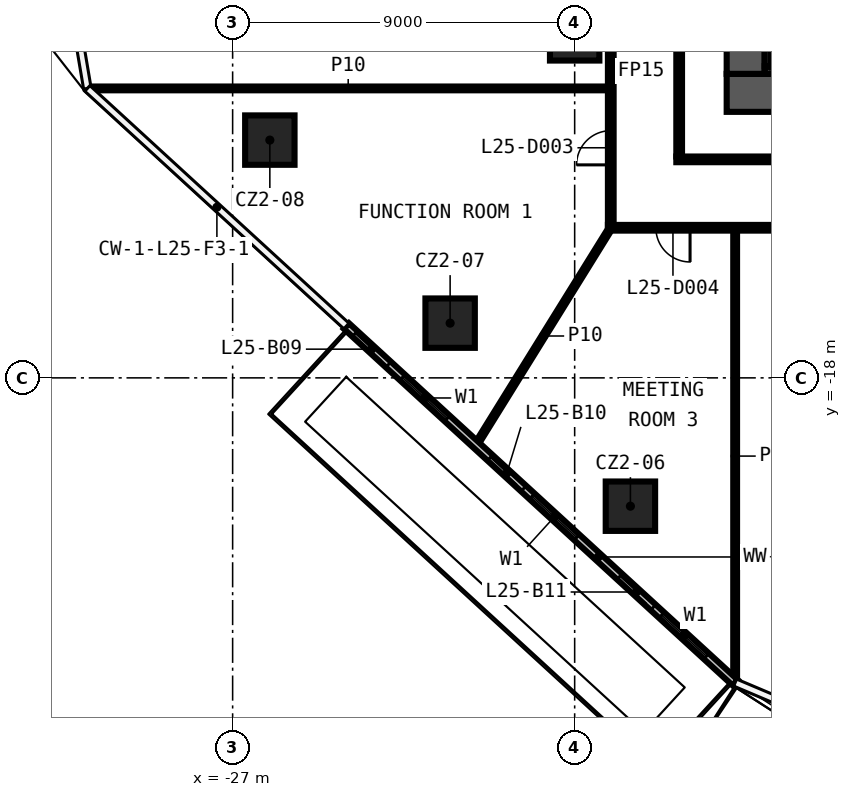
"""IFC4 building model, lengths in metres.
Left out: names, types, materials, properties, quantities, classifications, styles, units other than length and angle.
Written with IfcOpenShell. Run it as: python <this file> out.ifc"""

import sys

from ifc_helpers import new_model, si_unit, direction, frame, frame_2d, origin, origin_2d, place, context, subcontext, project, spatial, rectangle, extrude, element, fill, save


model = new_model("IFC4")
c1 = context("Model", 3, precision=1e-05, world=origin(), true_north=direction((0.0, 1.0)))
c2 = subcontext(c1, "Body", "Model", "MODEL_VIEW")
j1 = project(units=[si_unit("LENGTHUNIT", "METRE"), si_unit("PLANEANGLEUNIT", "RADIAN")], contexts=[c1])
p1 = place(None, origin())
s1 = spatial("IfcSite", under=j1, at=p1, CompositionType="ELEMENT")
p2 = place(p1, origin())
s2 = spatial("IfcBuilding", under=s1, at=p2, CompositionType="ELEMENT")
p3 = place(p2, frame((0.0, 0.0, 117.4)))
s3 = spatial("IfcBuildingStorey", under=s2, at=p3, CompositionType="ELEMENT", Elevation=117.4)
for number, where, z_axis, x_axis in (
    (1, (-16.533, -21.377, 0.0), (0.0, 0.0, 1.0), (1.0, 0.0, 0.0)),
    (2, (-21.277, -16.56, 0.0), (0.0, 0.0, 1.0), (1.0, 0.0, 0.0)),
    (3, (-26.021, -11.743, 0.0), (0.0, 0.0, 1.0), (1.0, 0.0, 0.0)),
    (4, (-18.0, -9.0, 0.0), (0.0, 0.0, 1.0), (1.0, 0.0, 0.0)),
):
    element("IfcColumn", number, at=place(p3, frame(where, z_axis=z_axis, x_axis=x_axis)), inside=s3, PredefinedType="COLUMN", context=c2, shape_type="SweptSolid", body=[
        extrude(rectangle(XDim=1.3, YDim=1.3, at=origin_2d()), origin(), (0.0, 0.0, 1.0), 3.3),
    ])
p4 = place(p3, frame((17.125, -14.05, 0.0), z_axis=(0.0, 0.0, 1.0), x_axis=(-1.0, 0.0, 0.0)))
e5 = element("IfcWall", 5, at=p4, inside=s3, PredefinedType="PARTITIONING", context=c2, shape_type="SweptSolid", body=[
    extrude(rectangle(XDim=34.25, YDim=0.15, at=frame_2d((17.125, 0.0))), origin(), (0.0, 0.0, 1.0), 3.3),
])
p5 = place(p4, frame((32.089, 0.0, 0.0)))
e6 = element("IfcOpeningElement", 6, at=p5, cuts=e5, PredefinedType="OPENING", context=c2, shape_type="SweptSolid", body=[
    extrude(rectangle(XDim=0.9, YDim=2.1, at=frame_2d((0.45, 1.05))), frame((0.0, 0.085, 0.0), z_axis=(0.0, -1.0, 0.0), x_axis=(1.0, 0.0, 0.0)), (0.0, 0.0, 1.0), 0.17),
])
p6 = place(p4, frame((25.666, 0.0, 0.0)))
e7 = element("IfcOpeningElement", 7, at=p6, cuts=e5, PredefinedType="OPENING", context=c2, shape_type="SweptSolid", body=[
    extrude(rectangle(XDim=1.0, YDim=2.1, at=frame_2d((0.5, 1.05))), frame((0.0, 0.085, 0.0), z_axis=(0.0, -1.0, 0.0), x_axis=(1.0, 0.0, 0.0)), (0.0, 0.0, 1.0), 0.17),
])
p7 = place(p4, frame((18.714, 0.0, 0.0)))
e8 = element("IfcOpeningElement", 8, at=p7, cuts=e5, PredefinedType="OPENING", context=c2, shape_type="SweptSolid", body=[
    extrude(rectangle(XDim=1.0, YDim=2.1, at=frame_2d((0.5, 1.05))), frame((0.0, 0.085, 0.0), z_axis=(0.0, -1.0, 0.0), x_axis=(1.0, 0.0, 0.0)), (0.0, 0.0, 1.0), 0.17),
])
p8 = place(p4, frame((16.558, 0.0, 0.0)))
e9 = element("IfcOpeningElement", 9, at=p8, cuts=e5, PredefinedType="OPENING", context=c2, shape_type="SweptSolid", body=[
    extrude(rectangle(XDim=1.0, YDim=2.1, at=frame_2d((0.5, 1.05))), frame((0.0, 0.085, 0.0), z_axis=(0.0, -1.0, 0.0), x_axis=(1.0, 0.0, 0.0)), (0.0, 0.0, 1.0), 0.17),
])
p9 = place(p4, frame((9.602, 0.0, 0.0)))
e10 = element("IfcOpeningElement", 10, at=p9, cuts=e5, PredefinedType="OPENING", context=c2, shape_type="SweptSolid", body=[
    extrude(rectangle(XDim=1.0, YDim=2.1, at=frame_2d((0.5, 1.05))), frame((0.0, 0.085, 0.0), z_axis=(0.0, -1.0, 0.0), x_axis=(1.0, 0.0, 0.0)), (0.0, 0.0, 1.0), 0.17),
])
p10 = place(p4, frame((7.451, 0.0, 0.0)))
e11 = element("IfcOpeningElement", 11, at=p10, cuts=e5, PredefinedType="OPENING", context=c2, shape_type="SweptSolid", body=[
    extrude(rectangle(XDim=1.0, YDim=2.1, at=frame_2d((0.5, 1.05))), frame((0.0, 0.085, 0.0), z_axis=(0.0, -1.0, 0.0), x_axis=(1.0, 0.0, 0.0)), (0.0, 0.0, 1.0), 0.17),
])
p11 = place(p4, frame((0.576, 0.0, 0.0)))
e12 = element("IfcOpeningElement", 12, at=p11, cuts=e5, PredefinedType="OPENING", context=c2, shape_type="SweptSolid", body=[
    extrude(rectangle(XDim=1.0, YDim=2.1, at=frame_2d((0.5, 1.05))), frame((0.0, 0.085, 0.0), z_axis=(0.0, -1.0, 0.0), x_axis=(1.0, 0.0, 0.0)), (0.0, 0.0, 1.0), 0.17),
])
p12 = place(p3, frame((-15.325, -12.25, 0.0), z_axis=(0.0, 0.0, 1.0), x_axis=(1.0, 0.0, 0.0)))
e13 = element("IfcWall", 13, at=p12, inside=s3, PredefinedType="PARTITIONING", context=c2, shape_type="SweptSolid", body=[
    extrude(rectangle(XDim=22.6, YDim=0.15, at=frame_2d((11.3, 0.0))), origin(), (0.0, 0.0, 1.0), 3.3),
])
p13 = place(p3, frame((-30.793, -10.383, 0.0), z_axis=(0.0, 0.0, 1.0), x_axis=(1.0, 0.0, 0.0)))
e14 = element("IfcWall", 14, at=p13, inside=s3, PredefinedType="PARTITIONING", context=c2, shape_type="SweptSolid", body=[
    extrude(rectangle(XDim=13.668, YDim=0.1, at=frame_2d((6.834, 0.0))), origin(), (0.0, 0.0, 1.0), 3.3),
])
p14 = place(p3, frame((-20.585, -19.747, 0.0), z_axis=(0.0, 0.0, 1.0), x_axis=(0.527253174698, 0.849708238027, 0.0)))
e15 = element("IfcWall", 15, at=p14, inside=s3, PredefinedType="PARTITIONING", context=c2, shape_type="SweptSolid", body=[
    extrude(rectangle(XDim=6.704, YDim=0.1, at=frame_2d((3.352, 0.0))), origin(), (0.0, 0.0, 1.0), 3.3),
])
p15 = place(p3, frame((-13.777, -25.992, 0.0), z_axis=(0.0, 0.0, 1.0), x_axis=(0.0, 1.0, 0.0)))
e16 = element("IfcWall", 16, at=p15, inside=s3, PredefinedType="PARTITIONING", context=c2, shape_type="SweptSolid", body=[
    extrude(rectangle(XDim=11.867, YDim=0.1, at=frame_2d((5.933, 0.0))), origin(), (0.0, 0.0, 1.0), 3.3),
])
p16 = place(p3, frame((-15.25, 12.175, 0.0), z_axis=(0.0, 0.0, 1.0), x_axis=(0.0, -1.0, 0.0)))
e17 = element("IfcWall", 17, at=p16, inside=s3, PredefinedType="PARTITIONING", context=c2, shape_type="SweptSolid", body=[
    extrude(rectangle(XDim=24.35, YDim=0.15, at=frame_2d((12.175, 0.0))), origin(), (0.0, 0.0, 1.0), 3.3),
])
p17 = place(p16, frame((11.725, 0.0, 0.0)))
e18 = element("IfcOpeningElement", 18, at=p17, cuts=e17, PredefinedType="OPENING", context=c2, shape_type="SweptSolid", body=[
    extrude(rectangle(XDim=0.9, YDim=2.1, at=frame_2d((0.45, 1.05))), frame((0.0, 0.085, 0.0), z_axis=(0.0, -1.0, 0.0), x_axis=(1.0, 0.0, 0.0)), (0.0, 0.0, 1.0), 0.17),
])
p18 = place(p3, frame((-17.05, -13.975, 0.0), z_axis=(0.0, 0.0, 1.0), x_axis=(0.0, 1.0, 0.0)))
e19 = element("IfcWall", 19, at=p18, inside=s3, PredefinedType="PARTITIONING", context=c2, shape_type="SweptSolid", body=[
    extrude(rectangle(XDim=27.95, YDim=0.15, at=frame_2d((13.975, 0.0))), origin(), (0.0, 0.0, 1.0), 3.3),
])
p19 = place(p18, frame((11.186, 0.0, 0.0)))
e20 = element("IfcOpeningElement", 20, at=p19, cuts=e19, PredefinedType="OPENING", context=c2, shape_type="SweptSolid", body=[
    extrude(rectangle(XDim=0.9, YDim=2.1, at=frame_2d((0.45, 1.05))), frame((0.0, 0.085, 0.0), z_axis=(0.0, -1.0, 0.0), x_axis=(1.0, 0.0, 0.0)), (0.0, 0.0, 1.0), 0.17),
])
p20 = place(p18, frame((8.404, 0.0, 0.0)))
e21 = element("IfcOpeningElement", 21, at=p20, cuts=e19, PredefinedType="OPENING", context=c2, shape_type="SweptSolid", body=[
    extrude(rectangle(XDim=0.9, YDim=2.1, at=frame_2d((0.45, 1.05))), frame((0.0, 0.085, 0.0), z_axis=(0.0, -1.0, 0.0), x_axis=(1.0, 0.0, 0.0)), (0.0, 0.0, 1.0), 0.17),
])
p21 = place(p18, frame((1.58, 0.0, 0.0)))
e22 = element("IfcOpeningElement", 22, at=p21, cuts=e19, PredefinedType="OPENING", context=c2, shape_type="SweptSolid", body=[
    extrude(rectangle(XDim=0.9, YDim=2.1, at=frame_2d((0.45, 1.05))), frame((0.0, 0.085, 0.0), z_axis=(0.0, -1.0, 0.0), x_axis=(1.0, 0.0, 0.0)), (0.0, 0.0, 1.0), 0.17),
])
p22 = place(p18, frame((24.871, 0.0, 0.0)))
e23 = element("IfcOpeningElement", 23, at=p22, cuts=e19, PredefinedType="OPENING", context=c2, shape_type="SweptSolid", body=[
    extrude(rectangle(XDim=0.9, YDim=2.1, at=frame_2d((0.45, 1.05))), frame((0.0, 0.085, 0.0), z_axis=(0.0, -1.0, 0.0), x_axis=(1.0, 0.0, 0.0)), (0.0, 0.0, 1.0), 0.17),
])
p23 = place(p18, frame((20.159, 0.0, 0.0)))
e24 = element("IfcOpeningElement", 24, at=p23, cuts=e19, PredefinedType="OPENING", context=c2, shape_type="SweptSolid", body=[
    extrude(rectangle(XDim=0.9, YDim=2.1, at=frame_2d((0.45, 1.05))), frame((0.0, 0.085, 0.0), z_axis=(0.0, -1.0, 0.0), x_axis=(1.0, 0.0, 0.0)), (0.0, 0.0, 1.0), 0.17),
])
p24 = place(p18, frame((16.211, 0.0, 0.0)))
e25 = element("IfcOpeningElement", 25, at=p24, cuts=e19, PredefinedType="OPENING", context=c2, shape_type="SweptSolid", body=[
    extrude(rectangle(XDim=0.9, YDim=2.1, at=frame_2d((0.45, 1.05))), frame((0.0, 0.085, 0.0), z_axis=(0.0, -1.0, 0.0), x_axis=(1.0, 0.0, 0.0)), (0.0, 0.0, 1.0), 0.17),
])
p25 = place(p3, frame((-24.006, -16.636, 0.0), z_axis=(0.0, 0.0, 1.0), x_axis=(0.736923378069, -0.675976282761, 0.0)))
e26 = element("IfcWall", 26, at=p25, inside=s3, PredefinedType="SOLIDWALL", context=c2, shape_type="SweptSolid", body=[
    extrude(rectangle(XDim=13.88, YDim=0.2, at=frame_2d((6.94, 0.0))), origin(), (0.0, 0.0, 1.0), 3.3),
])
p26 = place(p25, frame((2.0, 0.0, 0.6)))
e27 = element("IfcOpeningElement", 27, at=p26, cuts=e26, PredefinedType="OPENING", context=c2, shape_type="SweptSolid", body=[
    extrude(rectangle(XDim=1.6, YDim=2.4, at=frame_2d((0.8, 1.2))), frame((0.0, 0.11, 0.0), z_axis=(0.0, -1.0, 0.0), x_axis=(1.0, 0.0, 0.0)), (0.0, 0.0, 1.0), 0.22),
])
p27 = place(p25, frame((0.3, 0.0, 0.0)))
e28 = element("IfcOpeningElement", 28, at=p27, cuts=e26, PredefinedType="OPENING", context=c2, shape_type="SweptSolid", body=[
    extrude(rectangle(XDim=1.2, YDim=2.4, at=frame_2d((0.6, 1.2))), frame((0.0, 0.11, 0.0), z_axis=(0.0, -1.0, 0.0), x_axis=(1.0, 0.0, 0.0)), (0.0, 0.0, 1.0), 0.22),
])
p28 = place(p25, frame((6.627, 0.0, 0.6)))
e29 = element("IfcOpeningElement", 29, at=p28, cuts=e26, PredefinedType="OPENING", context=c2, shape_type="SweptSolid", body=[
    extrude(rectangle(XDim=1.6, YDim=2.4, at=frame_2d((0.8, 1.2))), frame((0.0, 0.11, 0.0), z_axis=(0.0, -1.0, 0.0), x_axis=(1.0, 0.0, 0.0)), (0.0, 0.0, 1.0), 0.22),
])
p29 = place(p25, frame((5.127, 0.0, 0.0)))
e30 = element("IfcOpeningElement", 30, at=p29, cuts=e26, PredefinedType="OPENING", context=c2, shape_type="SweptSolid", body=[
    extrude(rectangle(XDim=1.2, YDim=2.4, at=frame_2d((0.6, 1.2))), frame((0.0, 0.11, 0.0), z_axis=(0.0, -1.0, 0.0), x_axis=(1.0, 0.0, 0.0)), (0.0, 0.0, 1.0), 0.22),
])
p30 = place(p25, frame((11.253, 0.0, 0.6)))
e31 = element("IfcOpeningElement", 31, at=p30, cuts=e26, PredefinedType="OPENING", context=c2, shape_type="SweptSolid", body=[
    extrude(rectangle(XDim=1.6, YDim=2.4, at=frame_2d((0.8, 1.2))), frame((0.0, 0.11, 0.0), z_axis=(0.0, -1.0, 0.0), x_axis=(1.0, 0.0, 0.0)), (0.0, 0.0, 1.0), 0.22),
])
p31 = place(p25, frame((9.753, 0.0, 0.0)))
e32 = element("IfcOpeningElement", 32, at=p31, cuts=e26, PredefinedType="OPENING", context=c2, shape_type="SweptSolid", body=[
    extrude(rectangle(XDim=1.2, YDim=2.4, at=frame_2d((0.6, 1.2))), frame((0.0, 0.11, 0.0), z_axis=(0.0, -1.0, 0.0), x_axis=(1.0, 0.0, 0.0)), (0.0, 0.0, 1.0), 0.22),
])
p32 = place(p3, frame((14.0, -10.5, 0.0), z_axis=(0.0, 0.0, 1.0), x_axis=(-1.0, 0.0, 0.0)))
e33 = element("IfcWall", 33, at=p32, inside=s3, PredefinedType="SHEAR", context=c2, shape_type="SweptSolid", body=[
    extrude(rectangle(XDim=28.0, YDim=1.0, at=frame_2d((14.0, 0.0))), origin(), (0.0, 0.0, 1.0), 3.3),
])
p33 = place(p32, frame((5.1, 0.0, 0.0)))
e34 = element("IfcOpeningElement", 34, at=p33, cuts=e33, PredefinedType="OPENING", context=c2, shape_type="SweptSolid", body=[
    extrude(rectangle(XDim=1.6, YDim=2.1, at=frame_2d((0.8, 1.05))), frame((0.0, 0.51, 0.0), z_axis=(0.0, -1.0, 0.0), x_axis=(1.0, 0.0, 0.0)), (0.0, 0.0, 1.0), 1.02),
])
p34 = place(p3, frame((-13.5, -10.0, 0.0), z_axis=(0.0, 0.0, 1.0), x_axis=(0.0, 1.0, 0.0)))
e35 = element("IfcWall", 35, at=p34, inside=s3, PredefinedType="SHEAR", context=c2, shape_type="SweptSolid", body=[
    extrude(rectangle(XDim=20.0, YDim=1.0, at=frame_2d((10.0, 0.0))), origin(), (0.0, 0.0, 1.0), 3.3),
])
p35 = place(p3, frame((6.9, -9.9, 0.0), z_axis=(0.0, 0.0, 1.0), x_axis=(-1.0, 0.0, 0.0)))
e36 = element("IfcWall", 36, at=p35, inside=s3, PredefinedType="SHEAR", context=c2, shape_type="SweptSolid", body=[
    extrude(rectangle(XDim=19.9, YDim=0.2, at=frame_2d((9.95, 0.0))), origin(), (0.0, 0.0, 1.0), 3.3),
])
p36 = place(p3, frame((-12.9, -9.8, 0.0), z_axis=(0.0, 0.0, 1.0), x_axis=(0.0, 1.0, 0.0)))
e37 = element("IfcWall", 37, at=p36, inside=s3, PredefinedType="SHEAR", context=c2, shape_type="SweptSolid", body=[
    extrude(rectangle(XDim=19.6, YDim=0.2, at=frame_2d((9.8, 0.0))), origin(), (0.0, 0.0, 1.0), 3.3),
])
p37 = place(p21, origin())
e38 = element("IfcDoor", 38, at=p37, inside=s3, OperationType="SINGLE_SWING_LEFT", PredefinedType="DOOR", context=c2, shape_type="SweptSolid", body=[
    extrude(rectangle(XDim=0.9, YDim=2.1, at=frame_2d((0.45, 1.05))), frame((0.0, 0.025, 0.0), z_axis=(0.0, -1.0, 0.0), x_axis=(1.0, 0.0, 0.0)), (0.0, 0.0, 1.0), 0.05),
])
fill(e22, e38)
p38 = place(p5, origin())
e39 = element("IfcDoor", 39, at=p38, inside=s3, OperationType="SINGLE_SWING_RIGHT", PredefinedType="DOOR", context=c2, shape_type="SweptSolid", body=[
    extrude(rectangle(XDim=0.9, YDim=2.1, at=frame_2d((0.45, 1.05))), frame((0.0, 0.025, 0.0), z_axis=(0.0, -1.0, 0.0), x_axis=(1.0, 0.0, 0.0)), (0.0, 0.0, 1.0), 0.05),
])
fill(e6, e39)
p39 = place(p26, origin())
e40 = element("IfcWindow", 40, at=p39, inside=s3, PartitioningType="SINGLE_PANEL", PredefinedType="WINDOW", context=c2, shape_type="SweptSolid", body=[
    extrude(rectangle(XDim=1.6, YDim=2.4, at=frame_2d((0.8, 1.2))), frame((0.0, 0.03, 0.0), z_axis=(0.0, -1.0, 0.0), x_axis=(1.0, 0.0, 0.0)), (0.0, 0.0, 1.0), 0.06),
])
fill(e27, e40)
p40 = place(p27, origin())
e41 = element("IfcDoor", 41, at=p40, inside=s3, OperationType="SLIDING_TO_LEFT", PredefinedType="DOOR", context=c2, shape_type="SweptSolid", body=[
    extrude(rectangle(XDim=1.2, YDim=2.4, at=frame_2d((0.6, 1.2))), frame((0.0, 0.025, 0.0), z_axis=(0.0, -1.0, 0.0), x_axis=(1.0, 0.0, 0.0)), (0.0, 0.0, 1.0), 0.05),
])
fill(e28, e41)
p41 = place(p28, origin())
e42 = element("IfcWindow", 42, at=p41, inside=s3, PartitioningType="SINGLE_PANEL", PredefinedType="WINDOW", context=c2, shape_type="SweptSolid", body=[
    extrude(rectangle(XDim=1.6, YDim=2.4, at=frame_2d((0.8, 1.2))), frame((0.0, 0.03, 0.0), z_axis=(0.0, -1.0, 0.0), x_axis=(1.0, 0.0, 0.0)), (0.0, 0.0, 1.0), 0.06),
])
fill(e29, e42)
p42 = place(p29, origin())
e43 = element("IfcDoor", 43, at=p42, inside=s3, OperationType="SLIDING_TO_LEFT", PredefinedType="DOOR", context=c2, shape_type="SweptSolid", body=[
    extrude(rectangle(XDim=1.2, YDim=2.4, at=frame_2d((0.6, 1.2))), frame((0.0, 0.025, 0.0), z_axis=(0.0, -1.0, 0.0), x_axis=(1.0, 0.0, 0.0)), (0.0, 0.0, 1.0), 0.05),
])
fill(e30, e43)
p43 = place(p30, origin())
e44 = element("IfcWindow", 44, at=p43, inside=s3, PartitioningType="SINGLE_PANEL", PredefinedType="WINDOW", context=c2, shape_type="SweptSolid", body=[
    extrude(rectangle(XDim=1.6, YDim=2.4, at=frame_2d((0.8, 1.2))), frame((0.0, 0.03, 0.0), z_axis=(0.0, -1.0, 0.0), x_axis=(1.0, 0.0, 0.0)), (0.0, 0.0, 1.0), 0.06),
])
fill(e31, e44)
p44 = place(p31, origin())
e45 = element("IfcDoor", 45, at=p44, inside=s3, OperationType="SLIDING_TO_LEFT", PredefinedType="DOOR", context=c2, shape_type="SweptSolid", body=[
    extrude(rectangle(XDim=1.2, YDim=2.4, at=frame_2d((0.6, 1.2))), frame((0.0, 0.025, 0.0), z_axis=(0.0, -1.0, 0.0), x_axis=(1.0, 0.0, 0.0)), (0.0, 0.0, 1.0), 0.05),
])
fill(e32, e45)
save(model, sys.argv[1])
